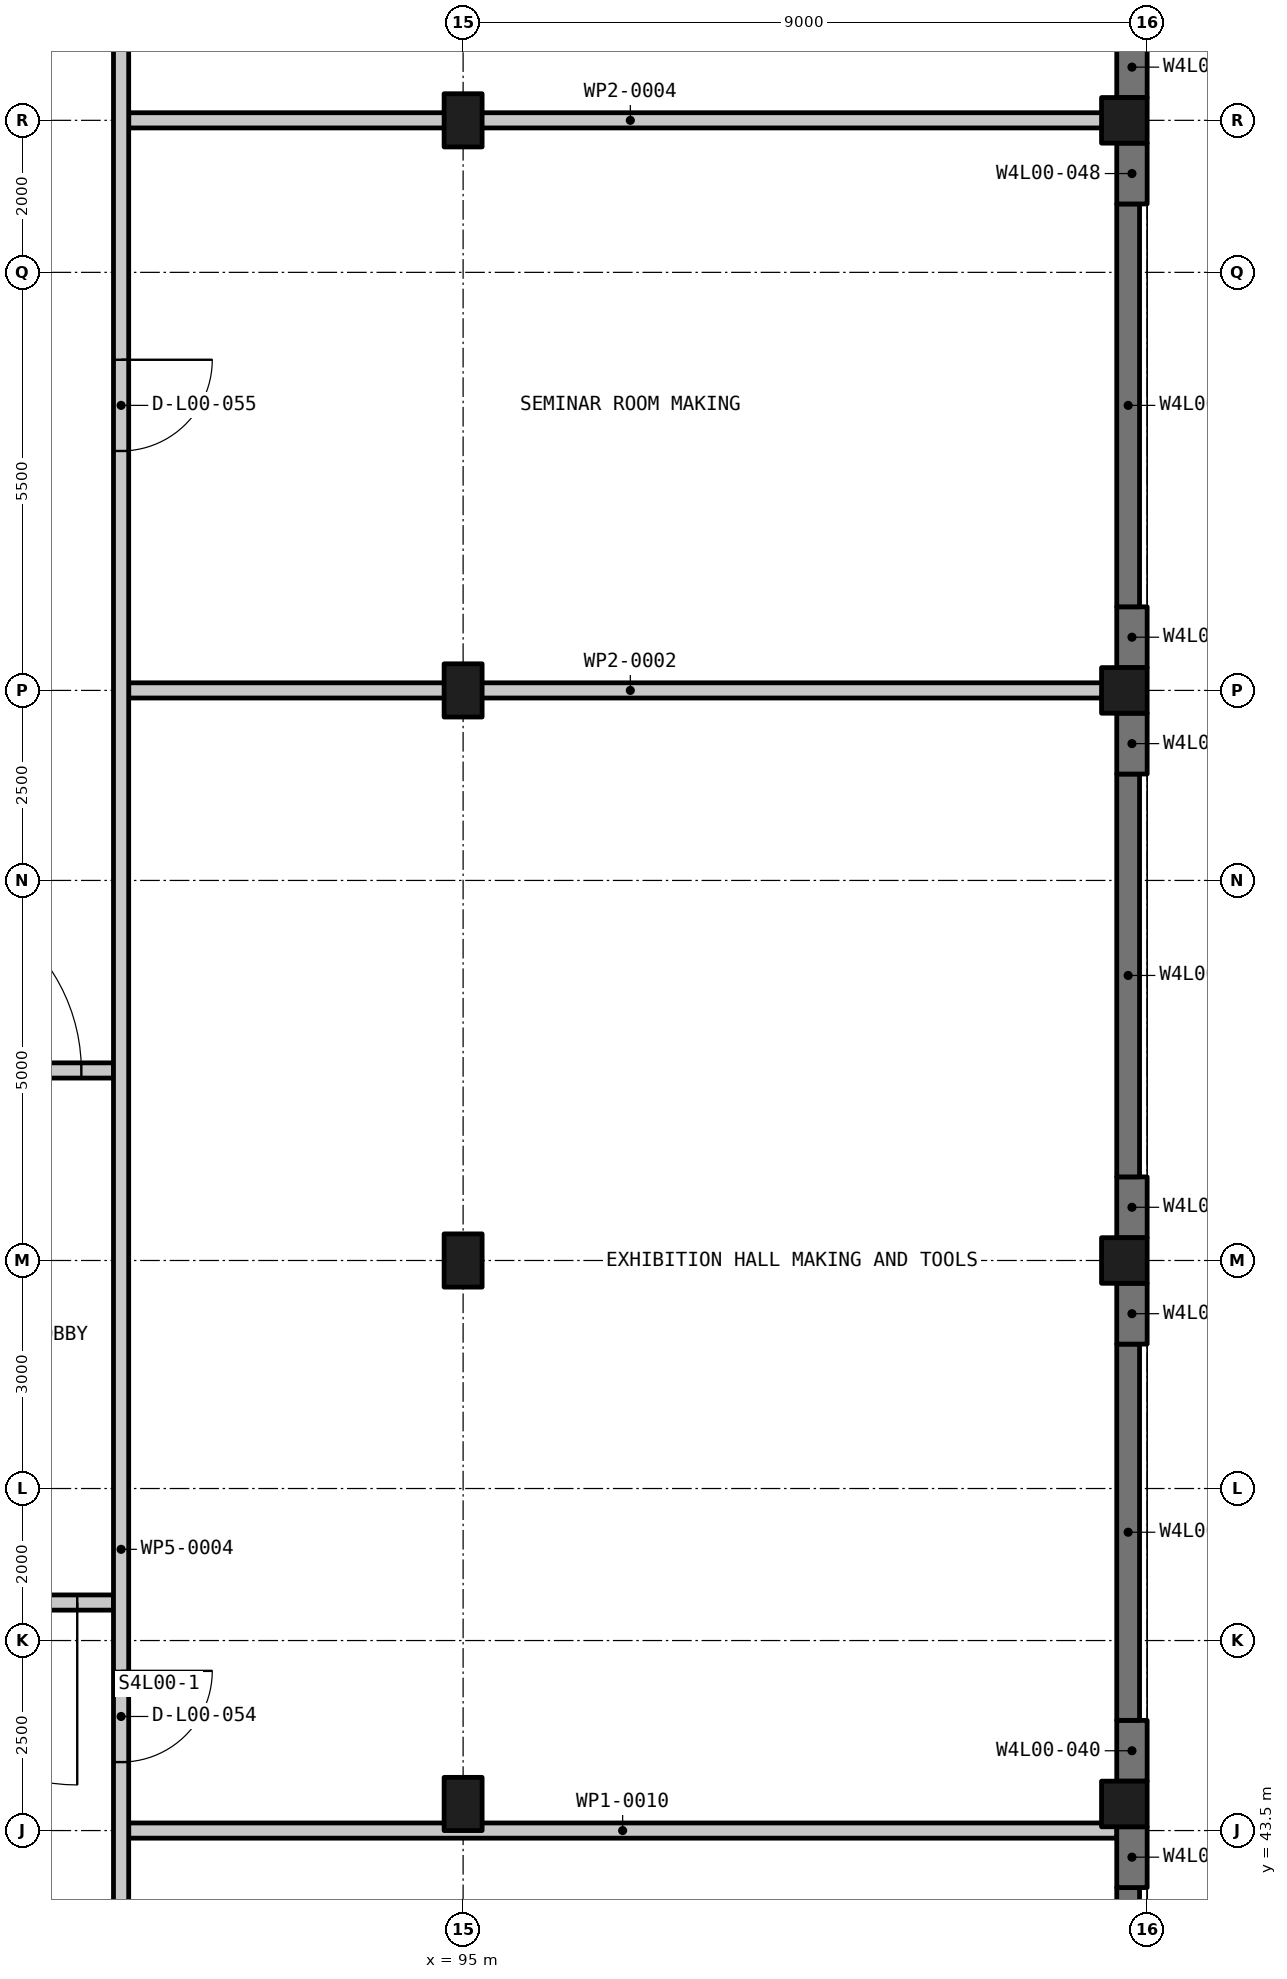
"""IFC4 building model, lengths in metres.
Left out: names, types, materials, properties, quantities, classifications, styles, units other than length and angle.
Written with IfcOpenShell. Run it as: python <this file> out.ifc"""

import sys

from ifc_helpers import new_model, si_unit, direction, frame, frame_2d, origin, origin_2d, place, context, subcontext, project, spatial, rectangle, extrude, element, fill, save


model = new_model("IFC4")
c1 = context("Model", 3, precision=1e-05, world=origin(), true_north=direction((0.0, 1.0)))
c2 = subcontext(c1, "Body", "Model", "MODEL_VIEW")
j1 = project(units=[si_unit("LENGTHUNIT", "METRE"), si_unit("PLANEANGLEUNIT", "RADIAN")], contexts=[c1])
p1 = place(None, origin())
s1 = spatial("IfcSite", under=j1, at=p1, CompositionType="ELEMENT")
p2 = place(p1, origin())
s2 = spatial("IfcBuilding", under=s1, at=p2, CompositionType="ELEMENT")
p3 = place(p2, origin())
s3 = spatial("IfcBuildingStorey", under=s2, at=p3, CompositionType="ELEMENT", Elevation=0.0)
for number, where, z_axis, x_axis in (
    (1, (95.0, 43.85, -0.2), (0.0, 0.0, 1.0), (1.0, 0.0, 0.0)),
    (2, (95.0, 51.0, -0.2), (0.0, 0.0, 1.0), (1.0, 0.0, 0.0)),
    (3, (95.0, 58.5, -0.2), (0.0, 0.0, 1.0), (1.0, 0.0, 0.0)),
    (4, (95.0, 66.0, -0.2), (0.0, 0.0, 1.0), (1.0, 0.0, 0.0)),
):
    element("IfcColumn", number, at=place(p3, frame(where, z_axis=z_axis, x_axis=x_axis)), inside=s3, PredefinedType="COLUMN", context=c2, shape_type="SweptSolid", body=[
        extrude(rectangle(XDim=0.5, YDim=0.7, at=origin_2d()), origin(), (0.0, 0.0, 1.0), 5.9),
    ])
for number, where, z_axis, x_axis in (
    (5, (103.7, 43.85, -0.2), (0.0, 0.0, 1.0), (1.0, 0.0, 0.0)),
    (6, (103.7, 51.0, -0.2), (0.0, 0.0, 1.0), (1.0, 0.0, 0.0)),
    (7, (103.7, 58.5, -0.2), (0.0, 0.0, 1.0), (1.0, 0.0, 0.0)),
    (8, (103.7, 66.0, -0.2), (0.0, 0.0, 1.0), (1.0, 0.0, 0.0)),
):
    element("IfcColumn", number, at=place(p3, frame(where, z_axis=z_axis, x_axis=x_axis)), inside=s3, PredefinedType="COLUMN", context=c2, shape_type="SweptSolid", body=[
        extrude(rectangle(XDim=0.6, YDim=0.6, at=origin_2d()), origin(), (0.0, 0.0, 1.0), 5.9),
    ])
p4 = place(p3, frame((103.75, 37.1, -0.2), z_axis=(0.0, 0.0, 1.0), x_axis=(0.0, 1.0, 0.0)))
e9 = element("IfcWall", 9, at=p4, inside=s3, PredefinedType="SOLIDWALL", context=c2, shape_type="SweptSolid", body=[
    extrude(rectangle(XDim=5.65, YDim=0.3, at=frame_2d((2.825, 0.0))), origin(), (0.0, 0.0, 1.0), 5.9),
])
for number, where, z_axis, x_axis in (
    (10, (103.8, 42.75, -0.2), (0.0, 0.0, 1.0), (0.0, 1.0, 0.0)),
    (11, (103.8, 44.15, -0.2), (0.0, 0.0, 1.0), (0.0, 1.0, 0.0)),
):
    element("IfcWall", number, at=place(p3, frame(where, z_axis=z_axis, x_axis=x_axis)), inside=s3, PredefinedType="SOLIDWALL", context=c2, shape_type="SweptSolid", body=[
        extrude(rectangle(XDim=0.8, YDim=0.4, at=frame_2d((0.4, 0.0))), origin(), (0.0, 0.0, 1.0), 5.9),
    ])
p5 = place(p3, frame((103.75, 44.95, -0.2), z_axis=(0.0, 0.0, 1.0), x_axis=(0.0, 1.0, 0.0)))
e12 = element("IfcWall", 12, at=p5, inside=s3, PredefinedType="SOLIDWALL", context=c2, shape_type="SweptSolid", body=[
    extrude(rectangle(XDim=4.95, YDim=0.3, at=frame_2d((2.475, 0.0))), origin(), (0.0, 0.0, 1.0), 5.9),
])
for number, where, z_axis, x_axis in (
    (13, (103.8, 49.9, -0.2), (0.0, 0.0, 1.0), (0.0, 1.0, 0.0)),
    (14, (103.8, 51.3, -0.2), (0.0, 0.0, 1.0), (0.0, 1.0, 0.0)),
):
    element("IfcWall", number, at=place(p3, frame(where, z_axis=z_axis, x_axis=x_axis)), inside=s3, PredefinedType="SOLIDWALL", context=c2, shape_type="SweptSolid", body=[
        extrude(rectangle(XDim=0.8, YDim=0.4, at=frame_2d((0.4, 0.0))), origin(), (0.0, 0.0, 1.0), 5.9),
    ])
p6 = place(p3, frame((103.75, 52.1, -0.2), z_axis=(0.0, 0.0, 1.0), x_axis=(0.0, 1.0, 0.0)))
e15 = element("IfcWall", 15, at=p6, inside=s3, PredefinedType="SOLIDWALL", context=c2, shape_type="SweptSolid", body=[
    extrude(rectangle(XDim=5.3, YDim=0.3, at=frame_2d((2.65, 0.0))), origin(), (0.0, 0.0, 1.0), 5.9),
])
for number, where, z_axis, x_axis in (
    (16, (103.8, 57.4, -0.2), (0.0, 0.0, 1.0), (0.0, 1.0, 0.0)),
    (17, (103.8, 58.8, -0.2), (0.0, 0.0, 1.0), (0.0, 1.0, 0.0)),
):
    element("IfcWall", number, at=place(p3, frame(where, z_axis=z_axis, x_axis=x_axis)), inside=s3, PredefinedType="SOLIDWALL", context=c2, shape_type="SweptSolid", body=[
        extrude(rectangle(XDim=0.8, YDim=0.4, at=frame_2d((0.4, 0.0))), origin(), (0.0, 0.0, 1.0), 5.9),
    ])
p7 = place(p3, frame((103.75, 59.6, -0.2), z_axis=(0.0, 0.0, 1.0), x_axis=(0.0, 1.0, 0.0)))
e18 = element("IfcWall", 18, at=p7, inside=s3, PredefinedType="SOLIDWALL", context=c2, shape_type="SweptSolid", body=[
    extrude(rectangle(XDim=5.3, YDim=0.3, at=frame_2d((2.65, 0.0))), origin(), (0.0, 0.0, 1.0), 5.9),
])
for number, where, z_axis, x_axis in (
    (19, (103.8, 64.9, -0.2), (0.0, 0.0, 1.0), (0.0, 1.0, 0.0)),
    (20, (103.8, 66.3, -0.2), (0.0, 0.0, 1.0), (0.0, 1.0, 0.0)),
):
    element("IfcWall", number, at=place(p3, frame(where, z_axis=z_axis, x_axis=x_axis)), inside=s3, PredefinedType="SOLIDWALL", context=c2, shape_type="SweptSolid", body=[
        extrude(rectangle(XDim=0.8, YDim=0.4, at=frame_2d((0.4, 0.0))), origin(), (0.0, 0.0, 1.0), 5.9),
    ])
p8 = place(p3, frame((90.6, 43.5, 0.0), z_axis=(0.0, 0.0, 1.0), x_axis=(1.0, 0.0, 0.0)))
e21 = element("IfcWall", 21, at=p8, inside=s3, PredefinedType="PARTITIONING", context=c2, shape_type="SweptSolid", body=[
    extrude(rectangle(XDim=12.998, YDim=0.2, at=frame_2d((6.499, 0.0))), origin(), (0.0, 0.0, 1.0), 4.9),
])
p9 = place(p3, frame((90.4, 46.5, 0.0), z_axis=(0.0, 0.0, 1.0), x_axis=(-1.0, 0.0, 0.0)))
e22 = element("IfcWall", 22, at=p9, inside=s3, PredefinedType="PARTITIONING", context=c2, shape_type="SweptSolid", body=[
    extrude(rectangle(XDim=3.3, YDim=0.2, at=frame_2d((1.65, 0.0))), origin(), (0.0, 0.0, 1.0), 4.9),
])
p10 = place(p9, frame((0.477, 0.0, 0.0)))
e23 = element("IfcOpeningElement", 23, at=p10, cuts=e22, PredefinedType="OPENING", context=c2, shape_type="SweptSolid", body=[
    extrude(rectangle(XDim=2.4, YDim=2.1, at=frame_2d((1.2, 1.05))), frame((0.0, 0.11, 0.0), z_axis=(0.0, -1.0, 0.0), x_axis=(1.0, 0.0, 0.0)), (0.0, 0.0, 1.0), 0.22),
])
p11 = place(p3, frame((87.1, 53.5, 0.0), z_axis=(0.0, 0.0, 1.0), x_axis=(1.0, 0.0, 0.0)))
e24 = element("IfcWall", 24, at=p11, inside=s3, PredefinedType="PARTITIONING", context=c2, shape_type="SweptSolid", body=[
    extrude(rectangle(XDim=3.3, YDim=0.2, at=frame_2d((1.65, 0.0))), origin(), (0.0, 0.0, 1.0), 4.9),
])
p12 = place(p11, frame((0.477, 0.0, 0.0)))
e25 = element("IfcOpeningElement", 25, at=p12, cuts=e24, PredefinedType="OPENING", context=c2, shape_type="SweptSolid", body=[
    extrude(rectangle(XDim=2.4, YDim=2.1, at=frame_2d((1.2, 1.05))), frame((0.0, 0.11, 0.0), z_axis=(0.0, -1.0, 0.0), x_axis=(1.0, 0.0, 0.0)), (0.0, 0.0, 1.0), 0.22),
])
for number, where, z_axis, x_axis in (
    (26, (90.6, 58.5, 0.0), (0.0, 0.0, 1.0), (1.0, 0.0, 0.0)),
    (27, (90.6, 66.0, 0.0), (0.0, 0.0, 1.0), (1.0, 0.0, 0.0)),
):
    element("IfcWall", number, at=place(p3, frame(where, z_axis=z_axis, x_axis=x_axis)), inside=s3, PredefinedType="PARTITIONING", context=c2, shape_type="SweptSolid", body=[
        extrude(rectangle(XDim=13.2, YDim=0.2, at=frame_2d((6.6, 0.0))), origin(), (0.0, 0.0, 1.0), 4.8),
    ])
p13 = place(p3, frame((90.5, 80.8, 0.0), z_axis=(0.0, 0.0, 1.0), x_axis=(0.0, -1.0, 0.0)))
e28 = element("IfcWall", 28, at=p13, inside=s3, PredefinedType="PARTITIONING", context=c2, shape_type="SweptSolid", body=[
    extrude(rectangle(XDim=67.2, YDim=0.2, at=frame_2d((33.6, 0.0))), origin(), (0.0, 0.0, 1.0), 4.8),
])
p14 = place(p13, frame((59.2, 0.0, 0.0)))
e29 = element("IfcOpeningElement", 29, at=p14, cuts=e28, PredefinedType="OPENING", context=c2, shape_type="SweptSolid", body=[
    extrude(rectangle(XDim=1.2, YDim=2.1, at=frame_2d((0.6, 1.05))), frame((0.0, 0.11, 0.0), z_axis=(0.0, -1.0, 0.0), x_axis=(1.0, 0.0, 0.0)), (0.0, 0.0, 1.0), 0.22),
])
p15 = place(p13, frame((44.2, 0.0, 0.0)))
e30 = element("IfcOpeningElement", 30, at=p15, cuts=e28, PredefinedType="OPENING", context=c2, shape_type="SweptSolid", body=[
    extrude(rectangle(XDim=1.2, YDim=2.1, at=frame_2d((0.6, 1.05))), frame((0.0, 0.11, 0.0), z_axis=(0.0, -1.0, 0.0), x_axis=(1.0, 0.0, 0.0)), (0.0, 0.0, 1.0), 0.22),
])
p16 = place(p13, frame((35.199, 0.0, 0.0)))
e31 = element("IfcOpeningElement", 31, at=p16, cuts=e28, PredefinedType="OPENING", context=c2, shape_type="SweptSolid", body=[
    extrude(rectangle(XDim=1.2, YDim=2.1, at=frame_2d((0.6, 1.05))), frame((0.0, 0.11, 0.0), z_axis=(0.0, -1.0, 0.0), x_axis=(1.0, 0.0, 0.0)), (0.0, 0.0, 1.0), 0.22),
])
p17 = place(p13, frame((17.95, 0.0, 0.0)))
e32 = element("IfcOpeningElement", 32, at=p17, cuts=e28, PredefinedType="OPENING", context=c2, shape_type="SweptSolid", body=[
    extrude(rectangle(XDim=1.2, YDim=2.1, at=frame_2d((0.6, 1.05))), frame((0.0, 0.11, 0.0), z_axis=(0.0, -1.0, 0.0), x_axis=(1.0, 0.0, 0.0)), (0.0, 0.0, 1.0), 0.22),
])
p18 = place(p13, frame((6.825, 0.0, 0.0)))
e33 = element("IfcOpeningElement", 33, at=p18, cuts=e28, PredefinedType="OPENING", context=c2, shape_type="SweptSolid", body=[
    extrude(rectangle(XDim=1.2, YDim=2.1, at=frame_2d((0.6, 1.05))), frame((0.0, 0.11, 0.0), z_axis=(0.0, -1.0, 0.0), x_axis=(1.0, 0.0, 0.0)), (0.0, 0.0, 1.0), 0.22),
])
p19 = place(p12, origin())
e34 = element("IfcDoor", 34, at=p19, inside=s3, OperationType="DOUBLE_DOOR_SINGLE_SWING", PredefinedType="DOOR", context=c2, shape_type="SweptSolid", body=[
    extrude(rectangle(XDim=2.4, YDim=2.1, at=frame_2d((1.2, 1.05))), frame((0.0, 0.025, 0.0), z_axis=(0.0, -1.0, 0.0), x_axis=(1.0, 0.0, 0.0)), (0.0, 0.0, 1.0), 0.05),
])
fill(e25, e34)
p20 = place(p10, origin())
e35 = element("IfcDoor", 35, at=p20, inside=s3, OperationType="DOUBLE_DOOR_SINGLE_SWING", PredefinedType="DOOR", context=c2, shape_type="SweptSolid", body=[
    extrude(rectangle(XDim=2.4, YDim=2.1, at=frame_2d((1.2, 1.05))), frame((0.0, 0.025, 0.0), z_axis=(0.0, -1.0, 0.0), x_axis=(1.0, 0.0, 0.0)), (0.0, 0.0, 1.0), 0.05),
])
fill(e23, e35)
p21 = place(p16, origin())
e36 = element("IfcDoor", 36, at=p21, inside=s3, OperationType="SINGLE_SWING_LEFT", PredefinedType="DOOR", context=c2, shape_type="SweptSolid", body=[
    extrude(rectangle(XDim=1.2, YDim=2.1, at=frame_2d((0.6, 1.05))), frame((0.0, 0.025, 0.0), z_axis=(0.0, -1.0, 0.0), x_axis=(1.0, 0.0, 0.0)), (0.0, 0.0, 1.0), 0.05),
])
fill(e31, e36)
p22 = place(p17, origin())
e37 = element("IfcDoor", 37, at=p22, inside=s3, OperationType="SINGLE_SWING_RIGHT", PredefinedType="DOOR", context=c2, shape_type="SweptSolid", body=[
    extrude(rectangle(XDim=1.2, YDim=2.1, at=frame_2d((0.6, 1.05))), frame((0.0, 0.025, 0.0), z_axis=(0.0, -1.0, 0.0), x_axis=(1.0, 0.0, 0.0)), (0.0, 0.0, 1.0), 0.05),
])
fill(e32, e37)
save(model, sys.argv[1])
